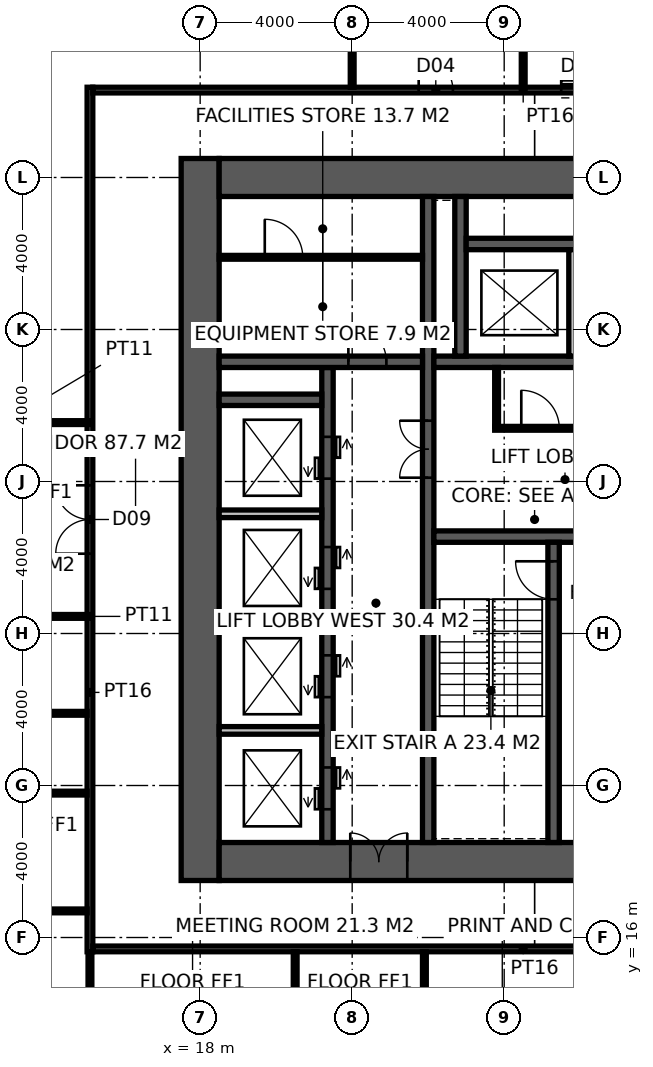
"""IFC4 building model, lengths in metres.
Left out: names, types, materials, properties, quantities, classifications, styles, units other than length and angle.
Written with IfcOpenShell. Run it as: python <this file> out.ifc"""

import sys

from ifc_helpers import new_model, si_unit, direction, frame, frame_2d, origin, place, context, subcontext, project, spatial, rectangle, extrude, element, fill, save


model = new_model("IFC4")
c1 = context("Model", 3, precision=1e-05, world=origin(), true_north=direction((0.0, 1.0)))
c2 = subcontext(c1, "Body", "Model", "MODEL_VIEW")
j1 = project(units=[si_unit("LENGTHUNIT", "METRE"), si_unit("PLANEANGLEUNIT", "RADIAN")], contexts=[c1])
p1 = place(None, origin())
s1 = spatial("IfcSite", under=j1, at=p1, CompositionType="ELEMENT")
p2 = place(p1, origin())
s2 = spatial("IfcBuilding", under=s1, at=p2, CompositionType="ELEMENT")
p3 = place(p2, frame((0.0, 0.0, 147.8)))
s3 = spatial("IfcBuildingStorey", under=s2, at=p3, CompositionType="ELEMENT", Elevation=147.8)
p4 = place(p3, frame((18.0, 17.5, -0.15), z_axis=(0.0, 0.0, 1.0), x_axis=(0.0, 1.0, 0.0)))
e1 = element("IfcWall", 1, at=p4, inside=s3, PredefinedType="SHEAR", context=c2, shape_type="SweptSolid", body=[
    extrude(rectangle(XDim=19.0, YDim=1.0, at=frame_2d((9.5, 0.0))), origin(), (0.0, 0.0, 1.0), 4.0),
])
p5 = place(p3, frame((18.5, 18.0, -0.15), z_axis=(0.0, 0.0, 1.0), x_axis=(1.0, 0.0, 0.0)))
e2 = element("IfcWall", 2, at=p5, inside=s3, PredefinedType="SHEAR", context=c2, shape_type="SweptSolid", body=[
    extrude(rectangle(XDim=17.6, YDim=1.0, at=frame_2d((8.8, 0.0))), origin(), (0.0, 0.0, 1.0), 4.0),
])
p6 = place(p5, frame((3.45, 0.0, 0.15)))
e3 = element("IfcOpeningElement", 3, at=p6, cuts=e2, PredefinedType="OPENING", context=c2, shape_type="SweptSolid", body=[
    extrude(rectangle(XDim=1.5, YDim=2.4, at=frame_2d((0.75, 1.2))), frame((0.0, 0.51, 0.0), z_axis=(0.0, -1.0, 0.0), x_axis=(1.0, 0.0, 0.0)), (0.0, 0.0, 1.0), 1.02),
])
p7 = place(p3, frame((18.5, 36.0, -0.15), z_axis=(0.0, 0.0, 1.0), x_axis=(1.0, 0.0, 0.0)))
e4 = element("IfcWall", 4, at=p7, inside=s3, PredefinedType="SHEAR", context=c2, shape_type="SweptSolid", body=[
    extrude(rectangle(XDim=17.6, YDim=1.0, at=frame_2d((8.8, 0.0))), origin(), (0.0, 0.0, 1.0), 4.0),
])
p8 = place(p3, frame((24.0, 18.5, -0.15), z_axis=(0.0, 0.0, 1.0), x_axis=(0.0, 1.0, 0.0)))
e5 = element("IfcWall", 5, at=p8, inside=s3, PredefinedType="SHEAR", context=c2, shape_type="SweptSolid", body=[
    extrude(rectangle(XDim=17.0, YDim=0.3, at=frame_2d((8.5, 0.0))), origin(), (0.0, 0.0, 1.0), 4.0),
])
p9 = place(p8, frame((9.6, 0.0, 0.15)))
e6 = element("IfcOpeningElement", 6, at=p9, cuts=e5, PredefinedType="OPENING", context=c2, shape_type="SweptSolid", body=[
    extrude(rectangle(XDim=1.5, YDim=2.4, at=frame_2d((0.75, 1.2))), frame((0.0, 0.16, 0.0), z_axis=(0.0, -1.0, 0.0), x_axis=(1.0, 0.0, 0.0)), (0.0, 0.0, 1.0), 0.32),
])
p10 = place(p3, frame((24.15, 26.55, -0.15), z_axis=(0.0, 0.0, 1.0), x_axis=(1.0, 0.0, 0.0)))
e7 = element("IfcWall", 7, at=p10, inside=s3, PredefinedType="SHEAR", context=c2, shape_type="SweptSolid", body=[
    extrude(rectangle(XDim=11.25, YDim=0.3, at=frame_2d((5.625, 0.0))), origin(), (0.0, 0.0, 1.0), 4.0),
])
p11 = place(p10, frame((9.25, 0.0, 0.15)))
e8 = element("IfcOpeningElement", 8, at=p11, cuts=e7, PredefinedType="OPENING", context=c2, shape_type="SweptSolid", body=[
    extrude(rectangle(XDim=1.0, YDim=2.2, at=frame_2d((0.5, 1.1))), frame((0.0, 0.16, 0.0), z_axis=(0.0, -1.0, 0.0), x_axis=(1.0, 0.0, 0.0)), (0.0, 0.0, 1.0), 0.32),
])
p12 = place(p10, frame((4.9, 0.0, 0.15)))
e9 = element("IfcOpeningElement", 9, at=p12, cuts=e7, PredefinedType="OPENING", context=c2, shape_type="SweptSolid", body=[
    extrude(rectangle(XDim=1.5, YDim=2.4, at=frame_2d((0.75, 1.2))), frame((0.0, 0.16, 0.0), z_axis=(0.0, -1.0, 0.0), x_axis=(1.0, 0.0, 0.0)), (0.0, 0.0, 1.0), 0.32),
])
p13 = place(p3, frame((27.3, 18.5, -0.15), z_axis=(0.0, 0.0, 1.0), x_axis=(0.0, 1.0, 0.0)))
e10 = element("IfcWall", 10, at=p13, inside=s3, PredefinedType="SHEAR", context=c2, shape_type="SweptSolid", body=[
    extrude(rectangle(XDim=7.9, YDim=0.3, at=frame_2d((3.95, 0.0))), origin(), (0.0, 0.0, 1.0), 4.0),
])
p14 = place(p13, frame((6.4, 0.0, 0.15)))
e11 = element("IfcOpeningElement", 11, at=p14, cuts=e10, PredefinedType="OPENING", context=c2, shape_type="SweptSolid", body=[
    extrude(rectangle(XDim=1.0, YDim=2.2, at=frame_2d((0.5, 1.1))), frame((0.0, 0.16, 0.0), z_axis=(0.0, -1.0, 0.0), x_axis=(1.0, 0.0, 0.0)), (0.0, 0.0, 1.0), 0.32),
])
p15 = place(p3, frame((24.15, 31.15, -0.15), z_axis=(0.0, 0.0, 1.0), x_axis=(1.0, 0.0, 0.0)))
e12 = element("IfcWall", 12, at=p15, inside=s3, PredefinedType="SHEAR", context=c2, shape_type="SweptSolid", body=[
    extrude(rectangle(XDim=11.25, YDim=0.3, at=frame_2d((5.625, 0.0))), origin(), (0.0, 0.0, 1.0), 4.0),
])
p16 = place(p15, frame((7.25, 0.0, 0.15)))
e13 = element("IfcOpeningElement", 13, at=p16, cuts=e12, PredefinedType="OPENING", context=c2, shape_type="SweptSolid", body=[
    extrude(rectangle(XDim=1.4, YDim=2.4, at=frame_2d((0.7, 1.2))), frame((0.0, 0.16, 0.0), z_axis=(0.0, -1.0, 0.0), x_axis=(1.0, 0.0, 0.0)), (0.0, 0.0, 1.0), 0.32),
])
p17 = place(p3, frame((21.35, 18.5, -0.15), z_axis=(0.0, 0.0, 1.0), x_axis=(0.0, 1.0, 0.0)))
e14 = element("IfcWall", 14, at=p17, inside=s3, PredefinedType="SHEAR", context=c2, shape_type="SweptSolid", body=[
    extrude(rectangle(XDim=12.5, YDim=0.3, at=frame_2d((6.25, 0.0))), origin(), (0.0, 0.0, 1.0), 4.0),
])
p18 = place(p17, frame((0.875, 0.0, 0.15)))
e15 = element("IfcOpeningElement", 15, at=p18, cuts=e14, PredefinedType="OPENING", context=c2, shape_type="SweptSolid", body=[
    extrude(rectangle(XDim=1.1, YDim=2.2, at=frame_2d((0.55, 1.1))), frame((0.0, 0.16, 0.0), z_axis=(0.0, -1.0, 0.0), x_axis=(1.0, 0.0, 0.0)), (0.0, 0.0, 1.0), 0.32),
])
p19 = place(p17, frame((3.825, 0.0, 0.15)))
e16 = element("IfcOpeningElement", 16, at=p19, cuts=e14, PredefinedType="OPENING", context=c2, shape_type="SweptSolid", body=[
    extrude(rectangle(XDim=1.1, YDim=2.2, at=frame_2d((0.55, 1.1))), frame((0.0, 0.16, 0.0), z_axis=(0.0, -1.0, 0.0), x_axis=(1.0, 0.0, 0.0)), (0.0, 0.0, 1.0), 0.32),
])
p20 = place(p17, frame((6.675, 0.0, 0.15)))
e17 = element("IfcOpeningElement", 17, at=p20, cuts=e14, PredefinedType="OPENING", context=c2, shape_type="SweptSolid", body=[
    extrude(rectangle(XDim=1.1, YDim=2.2, at=frame_2d((0.55, 1.1))), frame((0.0, 0.16, 0.0), z_axis=(0.0, -1.0, 0.0), x_axis=(1.0, 0.0, 0.0)), (0.0, 0.0, 1.0), 0.32),
])
p21 = place(p17, frame((9.575, 0.0, 0.15)))
e18 = element("IfcOpeningElement", 18, at=p21, cuts=e14, PredefinedType="OPENING", context=c2, shape_type="SweptSolid", body=[
    extrude(rectangle(XDim=1.1, YDim=2.2, at=frame_2d((0.55, 1.1))), frame((0.0, 0.16, 0.0), z_axis=(0.0, -1.0, 0.0), x_axis=(1.0, 0.0, 0.0)), (0.0, 0.0, 1.0), 0.32),
])
p22 = place(p3, frame((18.5, 31.15, -0.15), z_axis=(0.0, 0.0, 1.0), x_axis=(1.0, 0.0, 0.0)))
e19 = element("IfcWall", 19, at=p22, inside=s3, PredefinedType="SHEAR", context=c2, shape_type="SweptSolid", body=[
    extrude(rectangle(XDim=5.35, YDim=0.3, at=frame_2d((2.675, 0.0))), origin(), (0.0, 0.0, 1.0), 4.0),
])
p23 = place(p22, frame((3.4, 0.0, 0.15)))
e20 = element("IfcOpeningElement", 20, at=p23, cuts=e19, PredefinedType="OPENING", context=c2, shape_type="SweptSolid", body=[
    extrude(rectangle(XDim=1.0, YDim=2.2, at=frame_2d((0.5, 1.1))), frame((0.0, 0.16, 0.0), z_axis=(0.0, -1.0, 0.0), x_axis=(1.0, 0.0, 0.0)), (0.0, 0.0, 1.0), 0.32),
])
p24 = place(p3, frame((18.5, 30.15, -0.15), z_axis=(0.0, 0.0, 1.0), x_axis=(1.0, 0.0, 0.0)))
e21 = element("IfcWall", 21, at=p24, inside=s3, PredefinedType="SHEAR", context=c2, shape_type="SweptSolid", body=[
    extrude(rectangle(XDim=2.7, YDim=0.3, at=frame_2d((1.35, 0.0))), origin(), (0.0, 0.0, 1.0), 4.0),
])
p25 = place(p3, frame((24.85, 31.3, -0.15), z_axis=(0.0, 0.0, 1.0), x_axis=(0.0, 1.0, 0.0)))
e22 = element("IfcWall", 22, at=p25, inside=s3, PredefinedType="SHEAR", context=c2, shape_type="SweptSolid", body=[
    extrude(rectangle(XDim=4.2, YDim=0.3, at=frame_2d((2.1, 0.0))), origin(), (0.0, 0.0, 1.0), 4.0),
])
p26 = place(p3, frame((25.0, 34.25, -0.15), z_axis=(0.0, 0.0, 1.0), x_axis=(1.0, 0.0, 0.0)))
e23 = element("IfcWall", 23, at=p26, inside=s3, PredefinedType="SHEAR", context=c2, shape_type="SweptSolid", body=[
    extrude(rectangle(XDim=8.6, YDim=0.3, at=frame_2d((4.3, 0.0))), origin(), (0.0, 0.0, 1.0), 4.0),
])
p27 = place(p3, frame((27.8, 31.3, -0.15), z_axis=(0.0, 0.0, 1.0), x_axis=(0.0, 1.0, 0.0)))
e24 = element("IfcWall", 24, at=p27, inside=s3, PredefinedType="SOLIDWALL", context=c2, shape_type="SweptSolid", body=[
    extrude(rectangle(XDim=2.8, YDim=0.2, at=frame_2d((1.4, 0.0))), origin(), (0.0, 0.0, 1.0), 4.0),
])
for number, where, z_axis, x_axis in (
    (25, (18.5, 21.45, -0.15), (0.0, 0.0, 1.0), (1.0, 0.0, 0.0)),
    (26, (18.5, 24.3, -0.15), (0.0, 0.0, 1.0), (1.0, 0.0, 0.0)),
    (27, (18.5, 27.15, -0.15), (0.0, 0.0, 1.0), (1.0, 0.0, 0.0)),
):
    element("IfcWall", number, at=place(p3, frame(where, z_axis=z_axis, x_axis=x_axis)), inside=s3, PredefinedType="SOLIDWALL", context=c2, shape_type="SweptSolid", body=[
        extrude(rectangle(XDim=2.7, YDim=0.2, at=frame_2d((1.35, 0.0))), origin(), (0.0, 0.0, 1.0), 4.0),
    ])
p28 = place(p3, frame((18.5, 33.9, 0.0), z_axis=(0.0, 0.0, 1.0), x_axis=(1.0, 0.0, 0.0)))
e28 = element("IfcWall", 28, at=p28, inside=s3, PredefinedType="PARTITIONING", context=c2, shape_type="SweptSolid", body=[
    extrude(rectangle(XDim=5.35, YDim=0.1, at=frame_2d((2.675, 0.0))), origin(), (0.0, 0.0, 1.0), 3.85),
])
p29 = place(p28, frame((1.2, 0.0, 0.0)))
e29 = element("IfcOpeningElement", 29, at=p29, cuts=e28, PredefinedType="OPENING", context=c2, shape_type="SweptSolid", body=[
    extrude(rectangle(XDim=1.0, YDim=2.2, at=frame_2d((0.5, 1.1))), frame((0.0, 0.06, 0.0), z_axis=(0.0, -1.0, 0.0), x_axis=(1.0, 0.0, 0.0)), (0.0, 0.0, 1.0), 0.12),
])
p30 = place(p3, frame((25.75, 29.4, 0.0), z_axis=(0.0, 0.0, 1.0), x_axis=(1.0, 0.0, 0.0)))
e30 = element("IfcWall", 30, at=p30, inside=s3, PredefinedType="PARTITIONING", context=c2, shape_type="SweptSolid", body=[
    extrude(rectangle(XDim=4.7, YDim=0.1, at=frame_2d((2.35, 0.0))), origin(), (0.0, 0.0, 1.0), 3.85),
])
p31 = place(p30, frame((0.7, 0.0, 0.0)))
e31 = element("IfcOpeningElement", 31, at=p31, cuts=e30, PredefinedType="OPENING", context=c2, shape_type="SweptSolid", body=[
    extrude(rectangle(XDim=1.0, YDim=2.2, at=frame_2d((0.5, 1.1))), frame((0.0, 0.06, 0.0), z_axis=(0.0, -1.0, 0.0), x_axis=(1.0, 0.0, 0.0)), (0.0, 0.0, 1.0), 0.12),
])
p32 = place(p30, frame((3.0, 0.0, 0.0)))
e32 = element("IfcOpeningElement", 32, at=p32, cuts=e30, PredefinedType="OPENING", context=c2, shape_type="SweptSolid", body=[
    extrude(rectangle(XDim=1.0, YDim=2.2, at=frame_2d((0.5, 1.1))), frame((0.0, 0.06, 0.0), z_axis=(0.0, -1.0, 0.0), x_axis=(1.0, 0.0, 0.0)), (0.0, 0.0, 1.0), 0.12),
])
p33 = place(p3, frame((25.8, 29.45, 0.0), z_axis=(0.0, 0.0, 1.0), x_axis=(0.0, 1.0, 0.0)))
e33 = element("IfcWall", 33, at=p33, inside=s3, PredefinedType="PARTITIONING", context=c2, shape_type="SweptSolid", body=[
    extrude(rectangle(XDim=1.55, YDim=0.1, at=frame_2d((0.775, 0.0))), origin(), (0.0, 0.0, 1.0), 3.85),
])
p34 = place(p3, frame((15.1, 15.625, 0.0), z_axis=(0.0, 0.0, 1.0), x_axis=(0.0, 1.0, 0.0)))
e34 = element("IfcWall", 34, at=p34, inside=s3, PredefinedType="PARTITIONING", context=c2, shape_type="SweptSolid", body=[
    extrude(rectangle(XDim=22.75, YDim=0.15, at=frame_2d((11.375, 0.0))), origin(), (0.0, 0.0, 1.0), 3.85),
])
p35 = place(p34, frame((10.475, 0.0, 0.0)))
e35 = element("IfcOpeningElement", 35, at=p35, cuts=e34, PredefinedType="OPENING", context=c2, shape_type="SweptSolid", body=[
    extrude(rectangle(XDim=1.8, YDim=2.4, at=frame_2d((0.9, 1.2))), frame((0.0, 0.085, 0.0), z_axis=(0.0, -1.0, 0.0), x_axis=(1.0, 0.0, 0.0)), (0.0, 0.0, 1.0), 0.17),
])
p36 = place(p3, frame((15.175, 15.7, 0.0), z_axis=(0.0, 0.0, 1.0), x_axis=(1.0, 0.0, 0.0)))
e36 = element("IfcWall", 36, at=p36, inside=s3, PredefinedType="PARTITIONING", context=c2, shape_type="SweptSolid", body=[
    extrude(rectangle(XDim=22.65, YDim=0.15, at=frame_2d((11.325, 0.0))), origin(), (0.0, 0.0, 1.0), 3.85),
])
p37 = place(p3, frame((15.175, 38.3, 0.0), z_axis=(0.0, 0.0, 1.0), x_axis=(1.0, 0.0, 0.0)))
e37 = element("IfcWall", 37, at=p37, inside=s3, PredefinedType="PARTITIONING", context=c2, shape_type="SweptSolid", body=[
    extrude(rectangle(XDim=22.65, YDim=0.15, at=frame_2d((11.325, 0.0))), origin(), (0.0, 0.0, 1.0), 3.85),
])
p38 = place(p37, frame((8.575, 0.0, 0.0)))
e38 = element("IfcOpeningElement", 38, at=p38, cuts=e37, PredefinedType="OPENING", context=c2, shape_type="SweptSolid", body=[
    extrude(rectangle(XDim=0.9, YDim=2.1, at=frame_2d((0.45, 1.05))), frame((0.0, 0.085, 0.0), z_axis=(0.0, -1.0, 0.0), x_axis=(1.0, 0.0, 0.0)), (0.0, 0.0, 1.0), 0.17),
])
p39 = place(p37, frame((12.325, 0.0, 0.0)))
e39 = element("IfcOpeningElement", 39, at=p39, cuts=e37, PredefinedType="OPENING", context=c2, shape_type="SweptSolid", body=[
    extrude(rectangle(XDim=1.0, YDim=2.1, at=frame_2d((0.5, 1.05))), frame((0.0, 0.085, 0.0), z_axis=(0.0, -1.0, 0.0), x_axis=(1.0, 0.0, 0.0)), (0.0, 0.0, 1.0), 0.17),
])
p40 = place(p37, frame((16.175, 0.0, 0.0)))
e40 = element("IfcOpeningElement", 40, at=p40, cuts=e37, PredefinedType="OPENING", context=c2, shape_type="SweptSolid", body=[
    extrude(rectangle(XDim=0.9, YDim=2.1, at=frame_2d((0.45, 1.05))), frame((0.0, 0.085, 0.0), z_axis=(0.0, -1.0, 0.0), x_axis=(1.0, 0.0, 0.0)), (0.0, 0.0, 1.0), 0.17),
])
p41 = place(p3, frame((22.0, 38.375, 0.0), z_axis=(0.0, 0.0, 1.0), x_axis=(0.0, 1.0, 0.0)))
e41 = element("IfcWall", 41, at=p41, inside=s3, PredefinedType="PARTITIONING", context=c2, shape_type="SweptSolid", body=[
    extrude(rectangle(XDim=3.675, YDim=0.1, at=frame_2d((1.837, 0.0))), origin(), (0.0, 0.0, 1.0), 2.95),
])
p42 = place(p3, frame((26.5, 38.375, 0.0), z_axis=(0.0, 0.0, 1.0), x_axis=(0.0, 1.0, 0.0)))
e42 = element("IfcWall", 42, at=p42, inside=s3, PredefinedType="PARTITIONING", context=c2, shape_type="SweptSolid", body=[
    extrude(rectangle(XDim=3.575, YDim=0.1, at=frame_2d((1.788, 0.0))), origin(), (0.0, 0.0, 1.0), 3.85),
])
p43 = place(p3, frame((10.85, 16.7, 0.0), z_axis=(0.0, 0.0, 1.0), x_axis=(1.0, 0.0, 0.0)))
e43 = element("IfcWall", 43, at=p43, inside=s3, PredefinedType="PARTITIONING", context=c2, shape_type="SweptSolid", body=[
    extrude(rectangle(XDim=4.175, YDim=0.1, at=frame_2d((2.087, 0.0))), origin(), (0.0, 0.0, 1.0), 3.85),
])
p44 = place(p3, frame((10.95, 19.8, 0.0), z_axis=(0.0, 0.0, 1.0), x_axis=(1.0, 0.0, 0.0)))
e44 = element("IfcWall", 44, at=p44, inside=s3, PredefinedType="PARTITIONING", context=c2, shape_type="SweptSolid", body=[
    extrude(rectangle(XDim=4.075, YDim=0.1, at=frame_2d((2.038, 0.0))), origin(), (0.0, 0.0, 1.0), 2.85),
])
p45 = place(p3, frame((10.85, 21.9, 0.0), z_axis=(0.0, 0.0, 1.0), x_axis=(1.0, 0.0, 0.0)))
e45 = element("IfcWall", 45, at=p45, inside=s3, PredefinedType="PARTITIONING", context=c2, shape_type="SweptSolid", body=[
    extrude(rectangle(XDim=4.175, YDim=0.1, at=frame_2d((2.087, 0.0))), origin(), (0.0, 0.0, 1.0), 3.85),
])
for number, where, z_axis, x_axis in (
    (46, (15.1, 11.55, 0.0), (0.0, 0.0, 1.0), (0.0, 1.0, 0.0)),
    (47, (20.5, 11.55, 0.0), (0.0, 0.0, 1.0), (0.0, 1.0, 0.0)),
    (48, (23.9, 11.55, 0.0), (0.0, 0.0, 1.0), (0.0, 1.0, 0.0)),
):
    element("IfcWall", number, at=place(p3, frame(where, z_axis=z_axis, x_axis=x_axis)), inside=s3, PredefinedType="PARTITIONING", context=c2, shape_type="SweptSolid", body=[
        extrude(rectangle(XDim=4.075, YDim=0.1, at=frame_2d((2.038, 0.0))), origin(), (0.0, 0.0, 1.0), 3.85),
    ])
p46 = place(p3, frame((15.1, 29.55, 0.0), z_axis=(0.0, 0.0, 1.0), x_axis=(-1.0, 0.0, 0.0)))
e49 = element("IfcWall", 49, at=p46, inside=s3, PredefinedType="PARTITIONING", context=c2, shape_type="SweptSolid", body=[
    extrude(rectangle(XDim=4.5, YDim=0.1, at=frame_2d((2.25, 0.0))), origin(), (0.0, 0.0, 1.0), 3.85),
])
p47 = place(p3, frame((10.6, 24.45, 0.0), z_axis=(0.0, 0.0, 1.0), x_axis=(1.0, 0.0, 0.0)))
e50 = element("IfcWall", 50, at=p47, inside=s3, PredefinedType="PARTITIONING", context=c2, shape_type="SweptSolid", body=[
    extrude(rectangle(XDim=4.5, YDim=0.1, at=frame_2d((2.25, 0.0))), origin(), (0.0, 0.0, 1.0), 2.95),
])
p48 = place(p14, origin())
e51 = element("IfcDoor", 51, at=p48, inside=s3, OperationType="SINGLE_SWING_RIGHT", PredefinedType="DOOR", context=c2, shape_type="SweptSolid", body=[
    extrude(rectangle(XDim=1.0, YDim=2.2, at=frame_2d((0.5, 1.1))), frame((0.0, 0.025, 0.0), z_axis=(0.0, -1.0, 0.0), x_axis=(1.0, 0.0, 0.0)), (0.0, 0.0, 1.0), 0.05),
])
fill(e11, e51)
p49 = place(p9, origin())
e52 = element("IfcDoor", 52, at=p49, inside=s3, OperationType="DOUBLE_DOOR_DOUBLE_SWING", PredefinedType="DOOR", context=c2, shape_type="SweptSolid", body=[
    extrude(rectangle(XDim=1.5, YDim=2.4, at=frame_2d((0.75, 1.2))), frame((0.0, 0.025, 0.0), z_axis=(0.0, -1.0, 0.0), x_axis=(1.0, 0.0, 0.0)), (0.0, 0.0, 1.0), 0.05),
])
fill(e6, e52)
p50 = place(p23, origin())
e53 = element("IfcDoor", 53, at=p50, inside=s3, OperationType="SINGLE_SWING_LEFT", PredefinedType="DOOR", context=c2, shape_type="SweptSolid", body=[
    extrude(rectangle(XDim=1.0, YDim=2.2, at=frame_2d((0.5, 1.1))), frame((0.0, 0.025, 0.0), z_axis=(0.0, -1.0, 0.0), x_axis=(1.0, 0.0, 0.0)), (0.0, 0.0, 1.0), 0.05),
])
fill(e20, e53)
p51 = place(p29, origin())
e54 = element("IfcDoor", 54, at=p51, inside=s3, OperationType="SINGLE_SWING_LEFT", PredefinedType="DOOR", context=c2, shape_type="SweptSolid", body=[
    extrude(rectangle(XDim=1.0, YDim=2.2, at=frame_2d((0.5, 1.1))), frame((0.0, 0.025, 0.0), z_axis=(0.0, -1.0, 0.0), x_axis=(1.0, 0.0, 0.0)), (0.0, 0.0, 1.0), 0.05),
])
fill(e29, e54)
p52 = place(p31, origin())
e55 = element("IfcDoor", 55, at=p52, inside=s3, OperationType="SINGLE_SWING_LEFT", PredefinedType="DOOR", context=c2, shape_type="SweptSolid", body=[
    extrude(rectangle(XDim=1.0, YDim=2.2, at=frame_2d((0.5, 1.1))), frame((0.0, 0.025, 0.0), z_axis=(0.0, -1.0, 0.0), x_axis=(1.0, 0.0, 0.0)), (0.0, 0.0, 1.0), 0.05),
])
fill(e31, e55)
p53 = place(p6, origin())
e56 = element("IfcDoor", 56, at=p53, inside=s3, OperationType="DOUBLE_DOOR_DOUBLE_SWING", PredefinedType="DOOR", context=c2, shape_type="SweptSolid", body=[
    extrude(rectangle(XDim=1.5, YDim=2.4, at=frame_2d((0.75, 1.2))), frame((0.0, 0.025, 0.0), z_axis=(0.0, -1.0, 0.0), x_axis=(1.0, 0.0, 0.0)), (0.0, 0.0, 1.0), 0.05),
])
fill(e3, e56)
p54 = place(p38, origin())
e57 = element("IfcDoor", 57, at=p54, inside=s3, OperationType="SINGLE_SWING_LEFT", PredefinedType="DOOR", context=c2, shape_type="SweptSolid", body=[
    extrude(rectangle(XDim=0.9, YDim=2.1, at=frame_2d((0.45, 1.05))), frame((0.0, 0.025, 0.0), z_axis=(0.0, -1.0, 0.0), x_axis=(1.0, 0.0, 0.0)), (0.0, 0.0, 1.0), 0.05),
])
fill(e38, e57)
p55 = place(p39, origin())
e58 = element("IfcDoor", 58, at=p55, inside=s3, OperationType="SLIDING_TO_LEFT", PredefinedType="DOOR", context=c2, shape_type="SweptSolid", body=[
    extrude(rectangle(XDim=1.0, YDim=2.1, at=frame_2d((0.5, 1.05))), frame((0.0, 0.025, 0.0), z_axis=(0.0, -1.0, 0.0), x_axis=(1.0, 0.0, 0.0)), (0.0, 0.0, 1.0), 0.05),
])
fill(e39, e58)
p56 = place(p35, origin())
e59 = element("IfcDoor", 59, at=p56, inside=s3, OperationType="DOUBLE_DOOR_DOUBLE_SWING", PredefinedType="DOOR", context=c2, shape_type="SweptSolid", body=[
    extrude(rectangle(XDim=1.8, YDim=2.4, at=frame_2d((0.9, 1.2))), frame((0.0, 0.025, 0.0), z_axis=(0.0, -1.0, 0.0), x_axis=(1.0, 0.0, 0.0)), (0.0, 0.0, 1.0), 0.05),
])
fill(e35, e59)
p57 = place(p18, origin())
e60 = element("IfcDoor", 60, at=p57, inside=s3, OperationType="DOUBLE_DOOR_SLIDING", PredefinedType="DOOR", context=c2, shape_type="SweptSolid", body=[
    extrude(rectangle(XDim=1.1, YDim=2.2, at=frame_2d((0.55, 1.1))), frame((0.0, 0.025, 0.0), z_axis=(0.0, -1.0, 0.0), x_axis=(1.0, 0.0, 0.0)), (0.0, 0.0, 1.0), 0.05),
])
fill(e15, e60)
p58 = place(p19, origin())
e61 = element("IfcDoor", 61, at=p58, inside=s3, OperationType="DOUBLE_DOOR_SLIDING", PredefinedType="DOOR", context=c2, shape_type="SweptSolid", body=[
    extrude(rectangle(XDim=1.1, YDim=2.2, at=frame_2d((0.55, 1.1))), frame((0.0, 0.025, 0.0), z_axis=(0.0, -1.0, 0.0), x_axis=(1.0, 0.0, 0.0)), (0.0, 0.0, 1.0), 0.05),
])
fill(e16, e61)
p59 = place(p20, origin())
e62 = element("IfcDoor", 62, at=p59, inside=s3, OperationType="DOUBLE_DOOR_SLIDING", PredefinedType="DOOR", context=c2, shape_type="SweptSolid", body=[
    extrude(rectangle(XDim=1.1, YDim=2.2, at=frame_2d((0.55, 1.1))), frame((0.0, 0.025, 0.0), z_axis=(0.0, -1.0, 0.0), x_axis=(1.0, 0.0, 0.0)), (0.0, 0.0, 1.0), 0.05),
])
fill(e17, e62)
p60 = place(p21, origin())
e63 = element("IfcDoor", 63, at=p60, inside=s3, OperationType="DOUBLE_DOOR_SLIDING", PredefinedType="DOOR", context=c2, shape_type="SweptSolid", body=[
    extrude(rectangle(XDim=1.1, YDim=2.2, at=frame_2d((0.55, 1.1))), frame((0.0, 0.025, 0.0), z_axis=(0.0, -1.0, 0.0), x_axis=(1.0, 0.0, 0.0)), (0.0, 0.0, 1.0), 0.05),
])
fill(e18, e63)
save(model, sys.argv[1])
